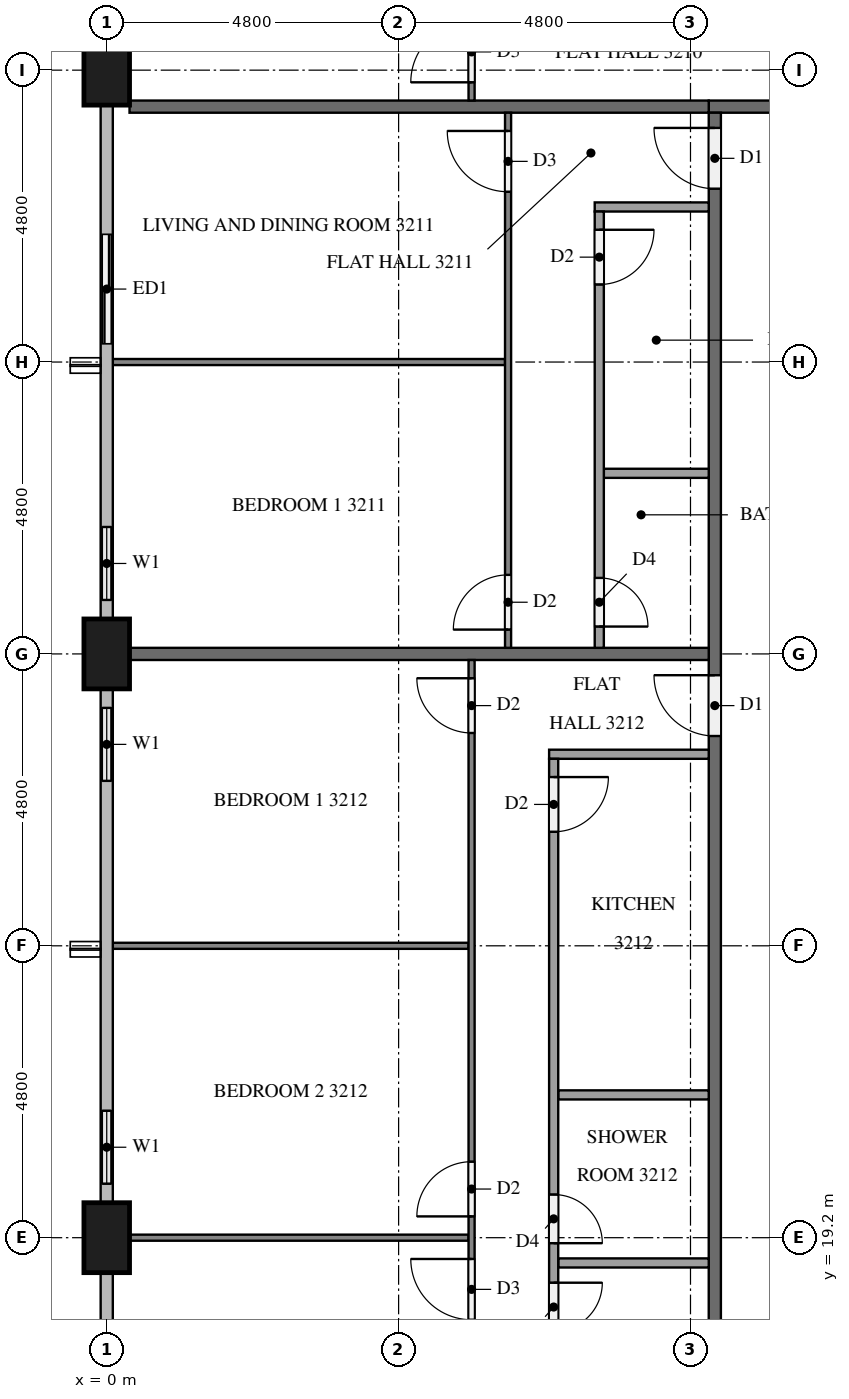
"""IFC4 building model, lengths in metres.
Left out: names, types, materials, properties, quantities, classifications, styles, units other than length and angle.
Written with IfcOpenShell. Run it as: python <this file> out.ifc"""

import sys

from ifc_helpers import new_model, si_unit, direction, frame, frame_2d, origin, origin_2d, place, context, subcontext, project, spatial, rectangle, extrude, element, fill, save


model = new_model("IFC4")
c1 = context("Model", 3, precision=1e-05, world=origin(), true_north=direction((0.0, 1.0)))
c2 = subcontext(c1, "Body", "Model", "MODEL_VIEW")
j1 = project(units=[si_unit("LENGTHUNIT", "METRE"), si_unit("PLANEANGLEUNIT", "RADIAN")], contexts=[c1])
p1 = place(None, origin())
s1 = spatial("IfcSite", under=j1, at=p1, CompositionType="ELEMENT")
p2 = place(p1, origin())
s2 = spatial("IfcBuilding", under=s1, at=p2, CompositionType="ELEMENT")
p3 = place(p2, frame((0.0, 0.0, 126.1)))
s3 = spatial("IfcBuildingStorey", under=s2, at=p3, CompositionType="ELEMENT", Elevation=126.1)
for number, where, z_axis, x_axis in (
    (1, (0.0, 38.4, 0.0), (0.0, 0.0, 1.0), (0.0, 1.0, 0.0)),
    (2, (0.0, 28.8, 0.0), (0.0, 0.0, 1.0), (0.0, 1.0, 0.0)),
    (3, (0.0, 19.2, 0.0), (0.0, 0.0, 1.0), (0.0, 1.0, 0.0)),
):
    element("IfcColumn", number, at=place(p3, frame(where, z_axis=z_axis, x_axis=x_axis)), inside=s3, PredefinedType="COLUMN", context=c2, shape_type="SweptSolid", body=[
        extrude(rectangle(XDim=1.15, YDim=0.75, at=origin_2d()), origin(), (0.0, 0.0, 1.0), 3.2),
    ])
p4 = place(p3, frame((0.0, 36.0, 0.0), z_axis=(0.0, 0.0, 1.0), x_axis=(0.0, -1.0, 0.0)))
e4 = element("IfcWall", 4, at=p4, inside=s3, PredefinedType="SOLIDWALL", context=c2, shape_type="SweptSolid", body=[
    extrude(rectangle(XDim=2.4, YDim=0.15, at=frame_2d((1.2, 0.0))), origin(), (0.0, 0.0, 1.0), 3.2),
])
p5 = place(p4, frame((0.3, 0.0, 0.0)))
e5 = element("IfcOpeningElement", 5, at=p5, cuts=e4, PredefinedType="OPENING", context=c2, shape_type="SweptSolid", body=[
    extrude(rectangle(XDim=1.8, YDim=2.4, at=frame_2d((0.9, 1.2))), frame((0.0, 0.085, 0.0), z_axis=(0.0, -1.0, 0.0), x_axis=(1.0, 0.0, 0.0)), (0.0, 0.0, 1.0), 0.17),
])
p6 = place(p3, frame((0.0, 31.2, 0.0), z_axis=(0.0, 0.0, 1.0), x_axis=(0.0, -1.0, 0.0)))
e6 = element("IfcWall", 6, at=p6, inside=s3, PredefinedType="SOLIDWALL", context=c2, shape_type="SweptSolid", body=[
    extrude(rectangle(XDim=1.825, YDim=0.15, at=frame_2d((0.913, 0.0))), origin(), (0.0, 0.0, 1.0), 3.2),
])
p7 = place(p6, frame((0.312, 0.0, 0.9)))
e7 = element("IfcOpeningElement", 7, at=p7, cuts=e6, PredefinedType="OPENING", context=c2, shape_type="SweptSolid", body=[
    extrude(rectangle(XDim=1.2, YDim=1.4, at=frame_2d((0.6, 0.7))), frame((0.0, 0.085, 0.0), z_axis=(0.0, -1.0, 0.0), x_axis=(1.0, 0.0, 0.0)), (0.0, 0.0, 1.0), 0.17),
])
p8 = place(p3, frame((0.0, 28.225, 0.0), z_axis=(0.0, 0.0, 1.0), x_axis=(0.0, -1.0, 0.0)))
e8 = element("IfcWall", 8, at=p8, inside=s3, PredefinedType="SOLIDWALL", context=c2, shape_type="SweptSolid", body=[
    extrude(rectangle(XDim=1.825, YDim=0.15, at=frame_2d((0.913, 0.0))), origin(), (0.0, 0.0, 1.0), 3.2),
])
p9 = place(p8, frame((0.312, 0.0, 0.9)))
e9 = element("IfcOpeningElement", 9, at=p9, cuts=e8, PredefinedType="OPENING", context=c2, shape_type="SweptSolid", body=[
    extrude(rectangle(XDim=1.2, YDim=1.4, at=frame_2d((0.6, 0.7))), frame((0.0, 0.085, 0.0), z_axis=(0.0, -1.0, 0.0), x_axis=(1.0, 0.0, 0.0)), (0.0, 0.0, 1.0), 0.17),
])
p10 = place(p3, frame((0.0, 21.6, 0.0), z_axis=(0.0, 0.0, 1.0), x_axis=(0.0, -1.0, 0.0)))
e10 = element("IfcWall", 10, at=p10, inside=s3, PredefinedType="SOLIDWALL", context=c2, shape_type="SweptSolid", body=[
    extrude(rectangle(XDim=1.825, YDim=0.15, at=frame_2d((0.913, 0.0))), origin(), (0.0, 0.0, 1.0), 3.2),
])
p11 = place(p10, frame((0.312, 0.0, 0.9)))
e11 = element("IfcOpeningElement", 11, at=p11, cuts=e10, PredefinedType="OPENING", context=c2, shape_type="SweptSolid", body=[
    extrude(rectangle(XDim=1.2, YDim=1.4, at=frame_2d((0.6, 0.7))), frame((0.0, 0.085, 0.0), z_axis=(0.0, -1.0, 0.0), x_axis=(1.0, 0.0, 0.0)), (0.0, 0.0, 1.0), 0.17),
])
p12 = place(p3, frame((12.1, 37.8, 0.0), z_axis=(0.0, 0.0, 1.0), x_axis=(-1.0, 0.0, 0.0)))
e12 = element("IfcWall", 12, at=p12, inside=s3, PredefinedType="PARTITIONING", context=c2, shape_type="SweptSolid", body=[
    extrude(rectangle(XDim=2.2, YDim=0.2, at=frame_2d((1.1, 0.0))), origin(), (0.0, 0.0, 1.0), 3.2),
])
p13 = place(p3, frame((10.0, 15.1, 0.0), z_axis=(0.0, 0.0, 1.0), x_axis=(0.0, 1.0, 0.0)))
e13 = element("IfcWall", 13, at=p13, inside=s3, PredefinedType="PARTITIONING", context=c2, shape_type="SweptSolid", body=[
    extrude(rectangle(XDim=22.6, YDim=0.2, at=frame_2d((11.3, 0.0))), origin(), (0.0, 0.0, 1.0), 3.2),
])
p14 = place(p13, frame((21.35, 0.0, 0.0)))
e14 = element("IfcOpeningElement", 14, at=p14, cuts=e13, PredefinedType="OPENING", context=c2, shape_type="SweptSolid", body=[
    extrude(rectangle(XDim=1.0, YDim=2.1, at=frame_2d((0.5, 1.05))), frame((0.0, 0.11, 0.0), z_axis=(0.0, -1.0, 0.0), x_axis=(1.0, 0.0, 0.0)), (0.0, 0.0, 1.0), 0.22),
])
p15 = place(p13, frame((12.35, 0.0, 0.0)))
e15 = element("IfcOpeningElement", 15, at=p15, cuts=e13, PredefinedType="OPENING", context=c2, shape_type="SweptSolid", body=[
    extrude(rectangle(XDim=1.0, YDim=2.1, at=frame_2d((0.5, 1.05))), frame((0.0, 0.11, 0.0), z_axis=(0.0, -1.0, 0.0), x_axis=(1.0, 0.0, 0.0)), (0.0, 0.0, 1.0), 0.22),
])
for number, where, z_axis, x_axis in (
    (16, (0.375, 37.8, 0.0), (0.0, 0.0, 1.0), (1.0, 0.0, 0.0)),
    (17, (0.375, 28.8, 0.0), (0.0, 0.0, 1.0), (1.0, 0.0, 0.0)),
):
    element("IfcWall", number, at=place(p3, frame(where, z_axis=z_axis, x_axis=x_axis)), inside=s3, PredefinedType="PARTITIONING", context=c2, shape_type="SweptSolid", body=[
        extrude(rectangle(XDim=9.525, YDim=0.2, at=frame_2d((4.762, 0.0))), origin(), (0.0, 0.0, 1.0), 3.2),
    ])
p16 = place(p3, frame((6.0, 37.9, 0.0), z_axis=(0.0, 0.0, 1.0), x_axis=(0.0, 1.0, 0.0)))
e18 = element("IfcWall", 18, at=p16, inside=s3, PredefinedType="PARTITIONING", context=c2, shape_type="SweptSolid", body=[
    extrude(rectangle(XDim=14.8, YDim=0.1, at=frame_2d((7.4, 0.0))), origin(), (0.0, 0.0, 1.0), 3.2),
])
p17 = place(p16, frame((0.3, 0.0, 0.0)))
e19 = element("IfcOpeningElement", 19, at=p17, cuts=e18, PredefinedType="OPENING", context=c2, shape_type="SweptSolid", body=[
    extrude(rectangle(XDim=1.0, YDim=2.1, at=frame_2d((0.5, 1.05))), frame((0.0, 0.06, 0.0), z_axis=(0.0, -1.0, 0.0), x_axis=(1.0, 0.0, 0.0)), (0.0, 0.0, 1.0), 0.12),
])
p18 = place(p16, frame((8.85, 0.0, 0.0)))
e20 = element("IfcOpeningElement", 20, at=p18, cuts=e18, PredefinedType="OPENING", context=c2, shape_type="SweptSolid", body=[
    extrude(rectangle(XDim=0.9, YDim=2.1, at=frame_2d((0.45, 1.05))), frame((0.0, 0.06, 0.0), z_axis=(0.0, -1.0, 0.0), x_axis=(1.0, 0.0, 0.0)), (0.0, 0.0, 1.0), 0.12),
])
p19 = place(p16, frame((10.45, 0.0, 0.0)))
e21 = element("IfcOpeningElement", 21, at=p19, cuts=e18, PredefinedType="OPENING", context=c2, shape_type="SweptSolid", body=[
    extrude(rectangle(XDim=0.9, YDim=2.1, at=frame_2d((0.45, 1.05))), frame((0.0, 0.06, 0.0), z_axis=(0.0, -1.0, 0.0), x_axis=(1.0, 0.0, 0.0)), (0.0, 0.0, 1.0), 0.12),
])
p20 = place(p3, frame((6.55, 33.6, 0.0), z_axis=(0.0, 0.0, 1.0), x_axis=(-1.0, 0.0, 0.0)))
e22 = element("IfcWall", 22, at=p20, inside=s3, PredefinedType="PARTITIONING", context=c2, shape_type="SweptSolid", body=[
    extrude(rectangle(XDim=6.45, YDim=0.1, at=frame_2d((3.225, 0.0))), origin(), (0.0, 0.0, 1.0), 3.2),
])
p21 = place(p3, frame((6.6, 28.9, 0.0), z_axis=(0.0, 0.0, 1.0), x_axis=(0.0, 1.0, 0.0)))
e23 = element("IfcWall", 23, at=p21, inside=s3, PredefinedType="PARTITIONING", context=c2, shape_type="SweptSolid", body=[
    extrude(rectangle(XDim=8.8, YDim=0.1, at=frame_2d((4.4, 0.0))), origin(), (0.0, 0.0, 1.0), 3.2),
])
p22 = place(p21, frame((7.5, 0.0, 0.0)))
e24 = element("IfcOpeningElement", 24, at=p22, cuts=e23, PredefinedType="OPENING", context=c2, shape_type="SweptSolid", body=[
    extrude(rectangle(XDim=1.0, YDim=2.1, at=frame_2d((0.5, 1.05))), frame((0.0, 0.06, 0.0), z_axis=(0.0, -1.0, 0.0), x_axis=(1.0, 0.0, 0.0)), (0.0, 0.0, 1.0), 0.12),
])
p23 = place(p21, frame((0.3, 0.0, 0.0)))
e25 = element("IfcOpeningElement", 25, at=p23, cuts=e23, PredefinedType="OPENING", context=c2, shape_type="SweptSolid", body=[
    extrude(rectangle(XDim=0.9, YDim=2.1, at=frame_2d((0.45, 1.05))), frame((0.0, 0.06, 0.0), z_axis=(0.0, -1.0, 0.0), x_axis=(1.0, 0.0, 0.0)), (0.0, 0.0, 1.0), 0.12),
])
p24 = place(p3, frame((9.9, 31.77, 0.0), z_axis=(0.0, 0.0, 1.0), x_axis=(-1.0, 0.0, 0.0)))
e26 = element("IfcWall", 26, at=p24, inside=s3, PredefinedType="PARTITIONING", context=c2, shape_type="SweptSolid", body=[
    extrude(rectangle(XDim=1.725, YDim=0.15, at=frame_2d((0.862, 0.0))), origin(), (0.0, 0.0, 1.0), 3.2),
])
p25 = place(p3, frame((9.9, 36.15, 0.0), z_axis=(0.0, 0.0, 1.0), x_axis=(-1.0, 0.0, 0.0)))
e27 = element("IfcWall", 27, at=p25, inside=s3, PredefinedType="PARTITIONING", context=c2, shape_type="SweptSolid", body=[
    extrude(rectangle(XDim=1.875, YDim=0.15, at=frame_2d((0.938, 0.0))), origin(), (0.0, 0.0, 1.0), 3.2),
])
p26 = place(p3, frame((8.1, 36.075, 0.0), z_axis=(0.0, 0.0, 1.0), x_axis=(0.0, -1.0, 0.0)))
e28 = element("IfcWall", 28, at=p26, inside=s3, PredefinedType="PARTITIONING", context=c2, shape_type="SweptSolid", body=[
    extrude(rectangle(XDim=7.175, YDim=0.15, at=frame_2d((3.587, 0.0))), origin(), (0.0, 0.0, 1.0), 3.2),
])
p27 = place(p26, frame((0.3, 0.0, 0.0)))
e29 = element("IfcOpeningElement", 29, at=p27, cuts=e28, PredefinedType="OPENING", context=c2, shape_type="SweptSolid", body=[
    extrude(rectangle(XDim=0.9, YDim=2.1, at=frame_2d((0.45, 1.05))), frame((0.0, 0.085, 0.0), z_axis=(0.0, -1.0, 0.0), x_axis=(1.0, 0.0, 0.0)), (0.0, 0.0, 1.0), 0.17),
])
p28 = place(p26, frame((6.025, 0.0, 0.0)))
e30 = element("IfcOpeningElement", 30, at=p28, cuts=e28, PredefinedType="OPENING", context=c2, shape_type="SweptSolid", body=[
    extrude(rectangle(XDim=0.8, YDim=2.1, at=frame_2d((0.4, 1.05))), frame((0.0, 0.085, 0.0), z_axis=(0.0, -1.0, 0.0), x_axis=(1.0, 0.0, 0.0)), (0.0, 0.0, 1.0), 0.17),
])
p29 = place(p3, frame((5.95, 24.0, 0.0), z_axis=(0.0, 0.0, 1.0), x_axis=(-1.0, 0.0, 0.0)))
e31 = element("IfcWall", 31, at=p29, inside=s3, PredefinedType="PARTITIONING", context=c2, shape_type="SweptSolid", body=[
    extrude(rectangle(XDim=5.85, YDim=0.1, at=frame_2d((2.925, 0.0))), origin(), (0.0, 0.0, 1.0), 3.2),
])
p30 = place(p3, frame((5.95, 19.2, 0.0), z_axis=(0.0, 0.0, 1.0), x_axis=(-1.0, 0.0, 0.0)))
e32 = element("IfcWall", 32, at=p30, inside=s3, PredefinedType="PARTITIONING", context=c2, shape_type="SweptSolid", body=[
    extrude(rectangle(XDim=5.575, YDim=0.1, at=frame_2d((2.788, 0.0))), origin(), (0.0, 0.0, 1.0), 3.2),
])
p31 = place(p3, frame((6.0, 15.1, 0.0), z_axis=(0.0, 0.0, 1.0), x_axis=(0.0, 1.0, 0.0)))
e33 = element("IfcWall", 33, at=p31, inside=s3, PredefinedType="PARTITIONING", context=c2, shape_type="SweptSolid", body=[
    extrude(rectangle(XDim=13.6, YDim=0.1, at=frame_2d((6.8, 0.0))), origin(), (0.0, 0.0, 1.0), 3.2),
])
p32 = place(p31, frame((12.4, 0.0, 0.0)))
e34 = element("IfcOpeningElement", 34, at=p32, cuts=e33, PredefinedType="OPENING", context=c2, shape_type="SweptSolid", body=[
    extrude(rectangle(XDim=0.9, YDim=2.1, at=frame_2d((0.45, 1.05))), frame((0.0, 0.06, 0.0), z_axis=(0.0, -1.0, 0.0), x_axis=(1.0, 0.0, 0.0)), (0.0, 0.0, 1.0), 0.12),
])
p33 = place(p31, frame((4.45, 0.0, 0.0)))
e35 = element("IfcOpeningElement", 35, at=p33, cuts=e33, PredefinedType="OPENING", context=c2, shape_type="SweptSolid", body=[
    extrude(rectangle(XDim=0.9, YDim=2.1, at=frame_2d((0.45, 1.05))), frame((0.0, 0.06, 0.0), z_axis=(0.0, -1.0, 0.0), x_axis=(1.0, 0.0, 0.0)), (0.0, 0.0, 1.0), 0.12),
])
p34 = place(p31, frame((2.75, 0.0, 0.0)))
e36 = element("IfcOpeningElement", 36, at=p34, cuts=e33, PredefinedType="OPENING", context=c2, shape_type="SweptSolid", body=[
    extrude(rectangle(XDim=1.0, YDim=2.1, at=frame_2d((0.5, 1.05))), frame((0.0, 0.06, 0.0), z_axis=(0.0, -1.0, 0.0), x_axis=(1.0, 0.0, 0.0)), (0.0, 0.0, 1.0), 0.12),
])
for number, where, z_axis, x_axis in (
    (37, (9.9, 21.548, 0.0), (0.0, 0.0, 1.0), (-1.0, 0.0, 0.0)),
    (38, (9.9, 18.785, 0.0), (0.0, 0.0, 1.0), (-1.0, 0.0, 0.0)),
):
    element("IfcWall", number, at=place(p3, frame(where, z_axis=z_axis, x_axis=x_axis)), inside=s3, PredefinedType="PARTITIONING", context=c2, shape_type="SweptSolid", body=[
        extrude(rectangle(XDim=2.475, YDim=0.15, at=frame_2d((1.237, 0.0))), origin(), (0.0, 0.0, 1.0), 3.2),
    ])
p35 = place(p3, frame((9.9, 27.15, 0.0), z_axis=(0.0, 0.0, 1.0), x_axis=(-1.0, 0.0, 0.0)))
e39 = element("IfcWall", 39, at=p35, inside=s3, PredefinedType="PARTITIONING", context=c2, shape_type="SweptSolid", body=[
    extrude(rectangle(XDim=2.625, YDim=0.15, at=frame_2d((1.312, 0.0))), origin(), (0.0, 0.0, 1.0), 3.2),
])
p36 = place(p3, frame((7.35, 27.075, 0.0), z_axis=(0.0, 0.0, 1.0), x_axis=(0.0, -1.0, 0.0)))
e40 = element("IfcWall", 40, at=p36, inside=s3, PredefinedType="PARTITIONING", context=c2, shape_type="SweptSolid", body=[
    extrude(rectangle(XDim=11.975, YDim=0.15, at=frame_2d((5.987, 0.0))), origin(), (0.0, 0.0, 1.0), 3.2),
])
p37 = place(p36, frame((0.3, 0.0, 0.0)))
e41 = element("IfcOpeningElement", 41, at=p37, cuts=e40, PredefinedType="OPENING", context=c2, shape_type="SweptSolid", body=[
    extrude(rectangle(XDim=0.9, YDim=2.1, at=frame_2d((0.45, 1.05))), frame((0.0, 0.085, 0.0), z_axis=(0.0, -1.0, 0.0), x_axis=(1.0, 0.0, 0.0)), (0.0, 0.0, 1.0), 0.17),
])
p38 = place(p36, frame((7.165, 0.0, 0.0)))
e42 = element("IfcOpeningElement", 42, at=p38, cuts=e40, PredefinedType="OPENING", context=c2, shape_type="SweptSolid", body=[
    extrude(rectangle(XDim=0.8, YDim=2.1, at=frame_2d((0.4, 1.05))), frame((0.0, 0.085, 0.0), z_axis=(0.0, -1.0, 0.0), x_axis=(1.0, 0.0, 0.0)), (0.0, 0.0, 1.0), 0.17),
])
p39 = place(p36, frame((8.615, 0.0, 0.0)))
e43 = element("IfcOpeningElement", 43, at=p39, cuts=e40, PredefinedType="OPENING", context=c2, shape_type="SweptSolid", body=[
    extrude(rectangle(XDim=0.8, YDim=2.1, at=frame_2d((0.4, 1.05))), frame((0.0, 0.085, 0.0), z_axis=(0.0, -1.0, 0.0), x_axis=(1.0, 0.0, 0.0)), (0.0, 0.0, 1.0), 0.17),
])
p40 = place(p5, origin())
e44 = element("IfcDoor", 44, at=p40, inside=s3, OperationType="SLIDING_TO_LEFT", PredefinedType="DOOR", context=c2, shape_type="SweptSolid", body=[
    extrude(rectangle(XDim=1.8, YDim=2.4, at=frame_2d((0.9, 1.2))), frame((0.0, 0.025, 0.0), z_axis=(0.0, -1.0, 0.0), x_axis=(1.0, 0.0, 0.0)), (0.0, 0.0, 1.0), 0.05),
])
fill(e5, e44)
p41 = place(p7, origin())
e45 = element("IfcWindow", 45, at=p41, inside=s3, PartitioningType="SINGLE_PANEL", PredefinedType="WINDOW", context=c2, shape_type="SweptSolid", body=[
    extrude(rectangle(XDim=1.2, YDim=1.4, at=frame_2d((0.6, 0.7))), frame((0.0, 0.03, 0.0), z_axis=(0.0, -1.0, 0.0), x_axis=(1.0, 0.0, 0.0)), (0.0, 0.0, 1.0), 0.06),
])
fill(e7, e45)
p42 = place(p9, origin())
e46 = element("IfcWindow", 46, at=p42, inside=s3, PartitioningType="SINGLE_PANEL", PredefinedType="WINDOW", context=c2, shape_type="SweptSolid", body=[
    extrude(rectangle(XDim=1.2, YDim=1.4, at=frame_2d((0.6, 0.7))), frame((0.0, 0.03, 0.0), z_axis=(0.0, -1.0, 0.0), x_axis=(1.0, 0.0, 0.0)), (0.0, 0.0, 1.0), 0.06),
])
fill(e9, e46)
p43 = place(p11, origin())
e47 = element("IfcWindow", 47, at=p43, inside=s3, PartitioningType="SINGLE_PANEL", PredefinedType="WINDOW", context=c2, shape_type="SweptSolid", body=[
    extrude(rectangle(XDim=1.2, YDim=1.4, at=frame_2d((0.6, 0.7))), frame((0.0, 0.03, 0.0), z_axis=(0.0, -1.0, 0.0), x_axis=(1.0, 0.0, 0.0)), (0.0, 0.0, 1.0), 0.06),
])
fill(e11, e47)
p44 = place(p14, origin())
e48 = element("IfcDoor", 48, at=p44, inside=s3, OperationType="SINGLE_SWING_RIGHT", PredefinedType="DOOR", context=c2, shape_type="SweptSolid", body=[
    extrude(rectangle(XDim=1.0, YDim=2.1, at=frame_2d((0.5, 1.05))), frame((0.0, 0.025, 0.0), z_axis=(0.0, -1.0, 0.0), x_axis=(1.0, 0.0, 0.0)), (0.0, 0.0, 1.0), 0.05),
])
fill(e14, e48)
p45 = place(p15, origin())
e49 = element("IfcDoor", 49, at=p45, inside=s3, OperationType="SINGLE_SWING_RIGHT", PredefinedType="DOOR", context=c2, shape_type="SweptSolid", body=[
    extrude(rectangle(XDim=1.0, YDim=2.1, at=frame_2d((0.5, 1.05))), frame((0.0, 0.025, 0.0), z_axis=(0.0, -1.0, 0.0), x_axis=(1.0, 0.0, 0.0)), (0.0, 0.0, 1.0), 0.05),
])
fill(e15, e49)
p46 = place(p17, origin())
e50 = element("IfcDoor", 50, at=p46, inside=s3, OperationType="SINGLE_SWING_LEFT", PredefinedType="DOOR", context=c2, shape_type="SweptSolid", body=[
    extrude(rectangle(XDim=1.0, YDim=2.1, at=frame_2d((0.5, 1.05))), frame((0.0, 0.025, 0.0), z_axis=(0.0, -1.0, 0.0), x_axis=(1.0, 0.0, 0.0)), (0.0, 0.0, 1.0), 0.05),
])
fill(e19, e50)
p47 = place(p22, origin())
e51 = element("IfcDoor", 51, at=p47, inside=s3, OperationType="SINGLE_SWING_RIGHT", PredefinedType="DOOR", context=c2, shape_type="SweptSolid", body=[
    extrude(rectangle(XDim=1.0, YDim=2.1, at=frame_2d((0.5, 1.05))), frame((0.0, 0.025, 0.0), z_axis=(0.0, -1.0, 0.0), x_axis=(1.0, 0.0, 0.0)), (0.0, 0.0, 1.0), 0.05),
])
fill(e24, e51)
p48 = place(p23, origin())
e52 = element("IfcDoor", 52, at=p48, inside=s3, OperationType="SINGLE_SWING_LEFT", PredefinedType="DOOR", context=c2, shape_type="SweptSolid", body=[
    extrude(rectangle(XDim=0.9, YDim=2.1, at=frame_2d((0.45, 1.05))), frame((0.0, 0.025, 0.0), z_axis=(0.0, -1.0, 0.0), x_axis=(1.0, 0.0, 0.0)), (0.0, 0.0, 1.0), 0.05),
])
fill(e25, e52)
p49 = place(p27, origin())
e53 = element("IfcDoor", 53, at=p49, inside=s3, OperationType="SINGLE_SWING_LEFT", PredefinedType="DOOR", context=c2, shape_type="SweptSolid", body=[
    extrude(rectangle(XDim=0.9, YDim=2.1, at=frame_2d((0.45, 1.05))), frame((0.0, 0.025, 0.0), z_axis=(0.0, -1.0, 0.0), x_axis=(1.0, 0.0, 0.0)), (0.0, 0.0, 1.0), 0.05),
])
fill(e29, e53)
p50 = place(p28, origin())
e54 = element("IfcDoor", 54, at=p50, inside=s3, OperationType="SINGLE_SWING_RIGHT", PredefinedType="DOOR", context=c2, shape_type="SweptSolid", body=[
    extrude(rectangle(XDim=0.8, YDim=2.1, at=frame_2d((0.4, 1.05))), frame((0.0, 0.025, 0.0), z_axis=(0.0, -1.0, 0.0), x_axis=(1.0, 0.0, 0.0)), (0.0, 0.0, 1.0), 0.05),
])
fill(e30, e54)
p51 = place(p32, origin())
e55 = element("IfcDoor", 55, at=p51, inside=s3, OperationType="SINGLE_SWING_RIGHT", PredefinedType="DOOR", context=c2, shape_type="SweptSolid", body=[
    extrude(rectangle(XDim=0.9, YDim=2.1, at=frame_2d((0.45, 1.05))), frame((0.0, 0.025, 0.0), z_axis=(0.0, -1.0, 0.0), x_axis=(1.0, 0.0, 0.0)), (0.0, 0.0, 1.0), 0.05),
])
fill(e34, e55)
p52 = place(p33, origin())
e56 = element("IfcDoor", 56, at=p52, inside=s3, OperationType="SINGLE_SWING_LEFT", PredefinedType="DOOR", context=c2, shape_type="SweptSolid", body=[
    extrude(rectangle(XDim=0.9, YDim=2.1, at=frame_2d((0.45, 1.05))), frame((0.0, 0.025, 0.0), z_axis=(0.0, -1.0, 0.0), x_axis=(1.0, 0.0, 0.0)), (0.0, 0.0, 1.0), 0.05),
])
fill(e35, e56)
p53 = place(p34, origin())
e57 = element("IfcDoor", 57, at=p53, inside=s3, OperationType="SINGLE_SWING_RIGHT", PredefinedType="DOOR", context=c2, shape_type="SweptSolid", body=[
    extrude(rectangle(XDim=1.0, YDim=2.1, at=frame_2d((0.5, 1.05))), frame((0.0, 0.025, 0.0), z_axis=(0.0, -1.0, 0.0), x_axis=(1.0, 0.0, 0.0)), (0.0, 0.0, 1.0), 0.05),
])
fill(e36, e57)
p54 = place(p37, origin())
e58 = element("IfcDoor", 58, at=p54, inside=s3, OperationType="SINGLE_SWING_LEFT", PredefinedType="DOOR", context=c2, shape_type="SweptSolid", body=[
    extrude(rectangle(XDim=0.9, YDim=2.1, at=frame_2d((0.45, 1.05))), frame((0.0, 0.025, 0.0), z_axis=(0.0, -1.0, 0.0), x_axis=(1.0, 0.0, 0.0)), (0.0, 0.0, 1.0), 0.05),
])
fill(e41, e58)
p55 = place(p38, origin())
e59 = element("IfcDoor", 59, at=p55, inside=s3, OperationType="SINGLE_SWING_RIGHT", PredefinedType="DOOR", context=c2, shape_type="SweptSolid", body=[
    extrude(rectangle(XDim=0.8, YDim=2.1, at=frame_2d((0.4, 1.05))), frame((0.0, 0.025, 0.0), z_axis=(0.0, -1.0, 0.0), x_axis=(1.0, 0.0, 0.0)), (0.0, 0.0, 1.0), 0.05),
])
fill(e42, e59)
p56 = place(p39, origin())
e60 = element("IfcDoor", 60, at=p56, inside=s3, OperationType="SINGLE_SWING_LEFT", PredefinedType="DOOR", context=c2, shape_type="SweptSolid", body=[
    extrude(rectangle(XDim=0.8, YDim=2.1, at=frame_2d((0.4, 1.05))), frame((0.0, 0.025, 0.0), z_axis=(0.0, -1.0, 0.0), x_axis=(1.0, 0.0, 0.0)), (0.0, 0.0, 1.0), 0.05),
])
fill(e43, e60)
save(model, sys.argv[1])
